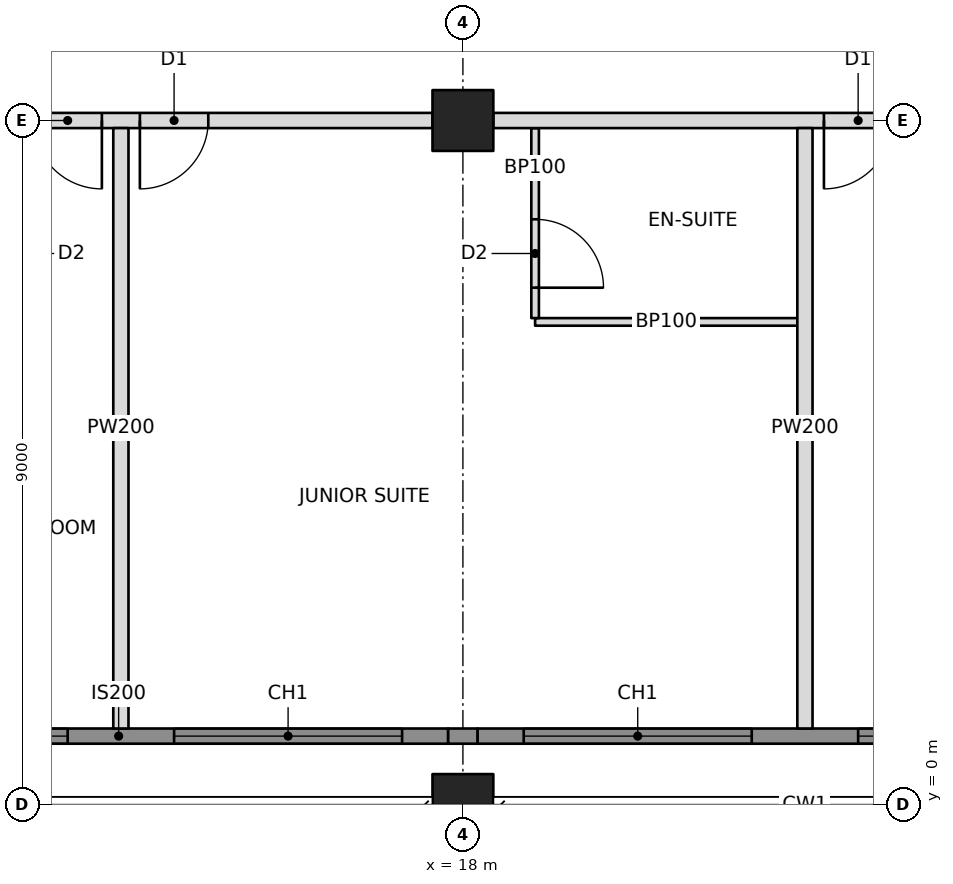
"""IFC4 building model, lengths in metres.
Left out: names, types, materials, properties, quantities, classifications, styles, units other than length and angle.
Written with IfcOpenShell. Run it as: python <this file> out.ifc"""

import sys

from ifc_helpers import new_model, si_unit, direction, frame, frame_2d, origin, origin_2d, place, context, subcontext, project, spatial, rectangle, hollow_rectangle, extrude, element, fill, save


model = new_model("IFC4")
c1 = context("Model", 3, precision=1e-05, world=origin(), true_north=direction((0.0, 1.0)))
c2 = subcontext(c1, "Body", "Model", "MODEL_VIEW")
j1 = project(units=[si_unit("LENGTHUNIT", "METRE"), si_unit("PLANEANGLEUNIT", "RADIAN")], contexts=[c1])
p1 = place(None, origin())
s1 = spatial("IfcSite", under=j1, at=p1, CompositionType="ELEMENT")
p2 = place(p1, origin())
s2 = spatial("IfcBuilding", under=s1, at=p2, CompositionType="ELEMENT")
p3 = place(p2, frame((0.0, 0.0, 204.6)))
s3 = spatial("IfcBuildingStorey", under=s2, at=p3, CompositionType="ELEMENT", Elevation=204.6)
p4 = place(p3, frame((18.0, 0.0, 0.0), z_axis=(0.0, 0.0, 1.0), x_axis=(1.0, 0.0, 0.0)))
e1 = element("IfcColumn", 1, at=p4, inside=s3, PredefinedType="COLUMN", context=c2, shape_type="SweptSolid", body=[
    extrude(hollow_rectangle(XDim=0.8, YDim=0.8, WallThickness=0.06, at=origin_2d()), origin(), (0.0, 0.0, 1.0), 3.4),
])
p5 = place(p3, frame((18.0, 9.0, 0.0), z_axis=(0.0, 0.0, 1.0), x_axis=(1.0, 0.0, 0.0)))
e2 = element("IfcColumn", 2, at=p5, inside=s3, PredefinedType="COLUMN", context=c2, shape_type="SweptSolid", body=[
    extrude(hollow_rectangle(XDim=0.8, YDim=0.8, WallThickness=0.05, at=origin_2d()), origin(), (0.0, 0.0, 1.0), 3.4),
])
p6 = place(p3, frame((9.4, 9.0, 0.0), z_axis=(0.0, 0.0, 1.0), x_axis=(1.0, 0.0, 0.0)))
e3 = element("IfcWall", 3, at=p6, inside=s3, PredefinedType="PARTITIONING", context=c2, shape_type="SweptSolid", body=[
    extrude(rectangle(XDim=8.2, YDim=0.2, at=frame_2d((4.1, 0.0))), origin(), (0.0, 0.0, 1.0), 2.405),
])
p7 = place(p6, frame((2.95, 0.0, 0.0)))
e4 = element("IfcOpeningElement", 4, at=p7, cuts=e3, PredefinedType="OPENING", context=c2, shape_type="SweptSolid", body=[
    extrude(rectangle(XDim=0.9, YDim=2.1, at=frame_2d((0.45, 1.05))), frame((0.0, 0.11, 0.0), z_axis=(0.0, -1.0, 0.0), x_axis=(1.0, 0.0, 0.0)), (0.0, 0.0, 1.0), 0.22),
])
p8 = place(p6, frame((4.35, 0.0, 0.0)))
e5 = element("IfcOpeningElement", 5, at=p8, cuts=e3, PredefinedType="OPENING", context=c2, shape_type="SweptSolid", body=[
    extrude(rectangle(XDim=0.9, YDim=2.1, at=frame_2d((0.45, 1.05))), frame((0.0, 0.11, 0.0), z_axis=(0.0, -1.0, 0.0), x_axis=(1.0, 0.0, 0.0)), (0.0, 0.0, 1.0), 0.22),
])
p9 = place(p3, frame((18.4, 9.0, 0.0), z_axis=(0.0, 0.0, 1.0), x_axis=(1.0, 0.0, 0.0)))
e6 = element("IfcWall", 6, at=p9, inside=s3, PredefinedType="PARTITIONING", context=c2, shape_type="SweptSolid", body=[
    extrude(rectangle(XDim=8.2, YDim=0.2, at=frame_2d((4.1, 0.0))), origin(), (0.0, 0.0, 1.0), 2.405),
])
p10 = place(p9, frame((4.35, 0.0, 0.0)))
e7 = element("IfcOpeningElement", 7, at=p10, cuts=e6, PredefinedType="OPENING", context=c2, shape_type="SweptSolid", body=[
    extrude(rectangle(XDim=0.9, YDim=2.1, at=frame_2d((0.45, 1.05))), frame((0.0, 0.11, 0.0), z_axis=(0.0, -1.0, 0.0), x_axis=(1.0, 0.0, 0.0)), (0.0, 0.0, 1.0), 0.22),
])
for number, where, z_axis, x_axis in (
    (8, (13.5, 8.9, 0.0), (0.0, 0.0, 1.0), (0.0, -1.0, 0.0)),
    (9, (22.5, 8.9, 0.0), (0.0, 0.0, 1.0), (0.0, -1.0, 0.0)),
):
    element("IfcWall", number, at=place(p3, frame(where, z_axis=z_axis, x_axis=x_axis)), inside=s3, PredefinedType="PARTITIONING", context=c2, shape_type="SweptSolid", body=[
        extrude(rectangle(XDim=7.9, YDim=0.2, at=frame_2d((3.95, 0.0))), origin(), (0.0, 0.0, 1.0), 2.404),
    ])
p11 = place(p3, frame((18.95, 6.35, 0.0), z_axis=(0.0, 0.0, 1.0), x_axis=(1.0, 0.0, 0.0)))
e10 = element("IfcWall", 10, at=p11, inside=s3, PredefinedType="PARTITIONING", context=c2, shape_type="SweptSolid", body=[
    extrude(rectangle(XDim=3.45, YDim=0.1, at=frame_2d((1.725, 0.0))), origin(), (0.0, 0.0, 1.0), 3.2),
])
p12 = place(p3, frame((18.95, 8.9, 0.0), z_axis=(0.0, 0.0, 1.0), x_axis=(0.0, -1.0, 0.0)))
e11 = element("IfcWall", 11, at=p12, inside=s3, PredefinedType="PARTITIONING", context=c2, shape_type="SweptSolid", body=[
    extrude(rectangle(XDim=2.5, YDim=0.1, at=frame_2d((1.25, 0.0))), origin(), (0.0, 0.0, 1.0), 2.404),
])
p13 = place(p12, frame((1.2, 0.0, 0.0)))
e12 = element("IfcOpeningElement", 12, at=p13, cuts=e11, PredefinedType="OPENING", context=c2, shape_type="SweptSolid", body=[
    extrude(rectangle(XDim=0.9, YDim=2.1, at=frame_2d((0.45, 1.05))), frame((0.0, 0.06, 0.0), z_axis=(0.0, -1.0, 0.0), x_axis=(1.0, 0.0, 0.0)), (0.0, 0.0, 1.0), 0.12),
])
p14 = place(p3, frame((9.135, 0.9, 0.0), z_axis=(0.0, 0.0, 1.0), x_axis=(1.0, 0.0, 0.0)))
e13 = element("IfcWall", 13, at=p14, inside=s3, PredefinedType="SOLIDWALL", context=c2, shape_type="SweptSolid", body=[
    extrude(rectangle(XDim=8.671, YDim=0.2, at=frame_2d((4.335, 0.0))), origin(), (0.0, 0.0, 1.0), 3.2),
])
p15 = place(p14, frame((0.665, 0.0, 0.6)))
e14 = element("IfcOpeningElement", 14, at=p15, cuts=e13, PredefinedType="OPENING", context=c2, shape_type="SweptSolid", body=[
    extrude(rectangle(XDim=3.0, YDim=2.2, at=frame_2d((1.5, 1.1))), frame((0.0, 0.11, 0.0), z_axis=(0.0, -1.0, 0.0), x_axis=(1.0, 0.0, 0.0)), (0.0, 0.0, 1.0), 0.22),
])
p16 = place(p14, frame((5.065, 0.0, 0.6)))
e15 = element("IfcOpeningElement", 15, at=p16, cuts=e13, PredefinedType="OPENING", context=c2, shape_type="SweptSolid", body=[
    extrude(rectangle(XDim=3.0, YDim=2.2, at=frame_2d((1.5, 1.1))), frame((0.0, 0.11, 0.0), z_axis=(0.0, -1.0, 0.0), x_axis=(1.0, 0.0, 0.0)), (0.0, 0.0, 1.0), 0.22),
])
p17 = place(p3, frame((17.806, 0.9, 0.0), z_axis=(0.0, 0.0, 1.0), x_axis=(1.0, 0.0, 0.0)))
e16 = element("IfcWall", 16, at=p17, inside=s3, PredefinedType="SOLIDWALL", context=c2, shape_type="SweptSolid", body=[
    extrude(rectangle(XDim=0.388, YDim=0.2, at=frame_2d((0.194, 0.0))), origin(), (0.0, 0.0, 1.0), 2.404),
])
p18 = place(p3, frame((18.194, 0.9, 0.0), z_axis=(0.0, 0.0, 1.0), x_axis=(1.0, 0.0, 0.0)))
e17 = element("IfcWall", 17, at=p18, inside=s3, PredefinedType="SOLIDWALL", context=c2, shape_type="SweptSolid", body=[
    extrude(rectangle(XDim=8.612, YDim=0.2, at=frame_2d((4.306, 0.0))), origin(), (0.0, 0.0, 1.0), 3.2),
])
p19 = place(p18, frame((0.606, 0.0, 0.6)))
e18 = element("IfcOpeningElement", 18, at=p19, cuts=e17, PredefinedType="OPENING", context=c2, shape_type="SweptSolid", body=[
    extrude(rectangle(XDim=3.0, YDim=2.2, at=frame_2d((1.5, 1.1))), frame((0.0, 0.11, 0.0), z_axis=(0.0, -1.0, 0.0), x_axis=(1.0, 0.0, 0.0)), (0.0, 0.0, 1.0), 0.22),
])
p20 = place(p18, frame((5.006, 0.0, 0.6)))
e19 = element("IfcOpeningElement", 19, at=p20, cuts=e17, PredefinedType="OPENING", context=c2, shape_type="SweptSolid", body=[
    extrude(rectangle(XDim=3.0, YDim=2.2, at=frame_2d((1.5, 1.1))), frame((0.0, 0.11, 0.0), z_axis=(0.0, -1.0, 0.0), x_axis=(1.0, 0.0, 0.0)), (0.0, 0.0, 1.0), 0.22),
])
p21 = place(p15, origin())
e20 = element("IfcWindow", 20, at=p21, inside=s3, PartitioningType="TRIPLE_PANEL_VERTICAL", PredefinedType="WINDOW", context=c2, shape_type="SweptSolid", body=[
    extrude(rectangle(XDim=3.0, YDim=2.2, at=frame_2d((1.5, 1.1))), frame((0.0, 0.03, 0.0), z_axis=(0.0, -1.0, 0.0), x_axis=(1.0, 0.0, 0.0)), (0.0, 0.0, 1.0), 0.06),
])
fill(e14, e20)
p22 = place(p16, origin())
e21 = element("IfcWindow", 21, at=p22, inside=s3, PartitioningType="TRIPLE_PANEL_VERTICAL", PredefinedType="WINDOW", context=c2, shape_type="SweptSolid", body=[
    extrude(rectangle(XDim=3.0, YDim=2.2, at=frame_2d((1.5, 1.1))), frame((0.0, 0.03, 0.0), z_axis=(0.0, -1.0, 0.0), x_axis=(1.0, 0.0, 0.0)), (0.0, 0.0, 1.0), 0.06),
])
fill(e15, e21)
p23 = place(p19, origin())
e22 = element("IfcWindow", 22, at=p23, inside=s3, PartitioningType="TRIPLE_PANEL_VERTICAL", PredefinedType="WINDOW", context=c2, shape_type="SweptSolid", body=[
    extrude(rectangle(XDim=3.0, YDim=2.2, at=frame_2d((1.5, 1.1))), frame((0.0, 0.03, 0.0), z_axis=(0.0, -1.0, 0.0), x_axis=(1.0, 0.0, 0.0)), (0.0, 0.0, 1.0), 0.06),
])
fill(e18, e22)
p24 = place(p20, origin())
e23 = element("IfcWindow", 23, at=p24, inside=s3, PartitioningType="TRIPLE_PANEL_VERTICAL", PredefinedType="WINDOW", context=c2, shape_type="SweptSolid", body=[
    extrude(rectangle(XDim=3.0, YDim=2.2, at=frame_2d((1.5, 1.1))), frame((0.0, 0.03, 0.0), z_axis=(0.0, -1.0, 0.0), x_axis=(1.0, 0.0, 0.0)), (0.0, 0.0, 1.0), 0.06),
])
fill(e19, e23)
p25 = place(p7, frame((0.9, 0.0, 0.0), z_axis=(0.0, 0.0, 1.0), x_axis=(-1.0, 0.0, 0.0)))
e24 = element("IfcDoor", 24, at=p25, inside=s3, OperationType="SINGLE_SWING_LEFT", PredefinedType="DOOR", context=c2, shape_type="SweptSolid", body=[
    extrude(rectangle(XDim=0.9, YDim=2.1, at=frame_2d((0.45, 1.05))), frame((0.0, 0.025, 0.0), z_axis=(0.0, -1.0, 0.0), x_axis=(1.0, 0.0, 0.0)), (0.0, 0.0, 1.0), 0.05),
])
fill(e4, e24)
p26 = place(p13, origin())
e25 = element("IfcDoor", 25, at=p26, inside=s3, OperationType="SINGLE_SWING_RIGHT", PredefinedType="DOOR", context=c2, shape_type="SweptSolid", body=[
    extrude(rectangle(XDim=0.9, YDim=2.1, at=frame_2d((0.45, 1.05))), frame((0.0, 0.025, 0.0), z_axis=(0.0, -1.0, 0.0), x_axis=(1.0, 0.0, 0.0)), (0.0, 0.0, 1.0), 0.05),
])
fill(e12, e25)
p27 = place(p8, frame((0.9, 0.0, 0.0), z_axis=(0.0, 0.0, 1.0), x_axis=(-1.0, 0.0, 0.0)))
e26 = element("IfcDoor", 26, at=p27, inside=s3, OperationType="SINGLE_SWING_RIGHT", PredefinedType="DOOR", context=c2, shape_type="SweptSolid", body=[
    extrude(rectangle(XDim=0.9, YDim=2.1, at=frame_2d((0.45, 1.05))), frame((0.0, 0.025, 0.0), z_axis=(0.0, -1.0, 0.0), x_axis=(1.0, 0.0, 0.0)), (0.0, 0.0, 1.0), 0.05),
])
fill(e5, e26)
p28 = place(p10, frame((0.9, 0.0, 0.0), z_axis=(0.0, 0.0, 1.0), x_axis=(-1.0, 0.0, 0.0)))
e27 = element("IfcDoor", 27, at=p28, inside=s3, OperationType="SINGLE_SWING_RIGHT", PredefinedType="DOOR", context=c2, shape_type="SweptSolid", body=[
    extrude(rectangle(XDim=0.9, YDim=2.1, at=frame_2d((0.45, 1.05))), frame((0.0, 0.025, 0.0), z_axis=(0.0, -1.0, 0.0), x_axis=(1.0, 0.0, 0.0)), (0.0, 0.0, 1.0), 0.05),
])
fill(e7, e27)
save(model, sys.argv[1])
